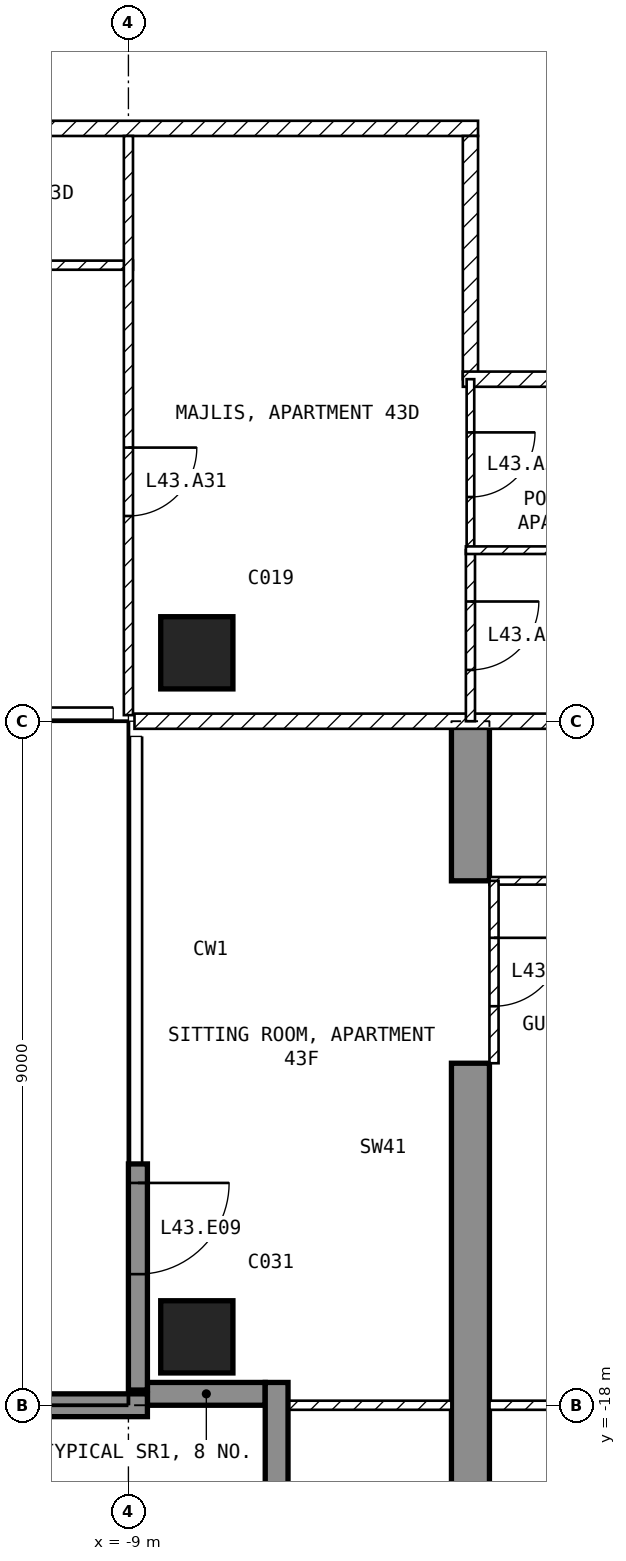
"""IFC4 building model, lengths in metres.
Left out: names, types, materials, properties, quantities, classifications, styles, units other than length and angle.
Written with IfcOpenShell. Run it as: python <this file> out.ifc"""

import sys

from ifc_helpers import new_model, si_unit, direction, frame, frame_2d, origin, origin_2d, place, context, subcontext, project, spatial, polyline, rectangle, outline, extrude, element, fill, save


model = new_model("IFC4")
c1 = context("Model", 3, precision=1e-05, world=origin(), true_north=direction((0.0, 1.0)))
c2 = subcontext(c1, "Body", "Model", "MODEL_VIEW")
j1 = project(units=[si_unit("LENGTHUNIT", "METRE"), si_unit("PLANEANGLEUNIT", "RADIAN")], contexts=[c1])
p1 = place(None, origin())
s1 = spatial("IfcSite", under=j1, at=p1, CompositionType="ELEMENT")
p2 = place(p1, origin())
s2 = spatial("IfcBuilding", under=s1, at=p2, CompositionType="ELEMENT")
p3 = place(p2, frame((0.0, 0.0, 177.1)))
s3 = spatial("IfcBuildingStorey", under=s2, at=p3, CompositionType="ELEMENT", Elevation=177.1)
for number, where, z_axis, x_axis in (
    (1, (-8.1, -17.1, -0.25), (0.0, 0.0, 1.0), (1.0, 0.0, 0.0)),
    (2, (-8.1, -8.1, -0.25), (0.0, 0.0, 1.0), (1.0, 0.0, 0.0)),
):
    element("IfcColumn", number, at=place(p3, frame(where, z_axis=z_axis, x_axis=x_axis)), inside=s3, PredefinedType="COLUMN", context=c2, shape_type="SweptSolid", body=[
        extrude(rectangle(XDim=0.95, YDim=0.95, at=origin_2d()), origin(), (0.0, 0.0, 1.0), 3.5),
    ])
p4 = place(p3, frame((-4.75, -20.225, -0.25), z_axis=(1.0, 0.0, 0.0), x_axis=(0.0, 1.0, 0.0)))
e3 = element("IfcWall", 3, at=p4, inside=s3, PredefinedType="SHEAR", context=c2, shape_type="SweptSolid", body=[
    extrude(outline(polyline([(0.0, 0.0), (6.725, 0.0), (6.725, 2.65), (9.125, 2.65), (9.125, 0.0), (11.225, 0.0), (11.225, 3.5), (0.0, 3.5), (0.0, 0.0)])), origin(), (0.0, 0.0, 1.0), 0.5),
])
p5 = place(p3, frame((-8.875, -14.825, 0.0), z_axis=(0.0, 0.0, 1.0), x_axis=(0.0, -1.0, 0.0)))
e4 = element("IfcWall", 4, at=p5, inside=s3, PredefinedType="SOLIDWALL", context=c2, shape_type="SweptSolid", body=[
    extrude(rectangle(XDim=2.975, YDim=0.25, at=frame_2d((1.488, 0.0))), origin(), (0.0, 0.0, 1.0), 3.25),
])
p6 = place(p5, frame((0.25, 0.0, 0.0)))
e5 = element("IfcOpeningElement", 5, at=p6, cuts=e4, PredefinedType="OPENING", context=c2, shape_type="SweptSolid", body=[
    extrude(rectangle(XDim=1.2, YDim=2.4, at=frame_2d((0.6, 1.2))), frame((0.0, 0.135, 0.0), z_axis=(0.0, -1.0, 0.0), x_axis=(1.0, 0.0, 0.0)), (0.0, 0.0, 1.0), 0.27),
])
p7 = place(p3, frame((-8.75, -17.85, 0.0), z_axis=(0.0, 0.0, 1.0), x_axis=(1.0, 0.0, 0.0)))
e6 = element("IfcWall", 6, at=p7, inside=s3, PredefinedType="SOLIDWALL", context=c2, shape_type="SweptSolid", body=[
    extrude(rectangle(XDim=1.55, YDim=0.3, at=frame_2d((0.775, 0.0))), origin(), (0.0, 0.0, 1.0), 3.25),
])
p8 = place(p3, frame((-7.05, -17.7, 0.0), z_axis=(0.0, 0.0, 1.0), x_axis=(0.0, -1.0, 0.0)))
e7 = element("IfcWall", 7, at=p8, inside=s3, PredefinedType="SOLIDWALL", context=c2, shape_type="SweptSolid", body=[
    extrude(rectangle(XDim=1.8, YDim=0.3, at=frame_2d((0.9, 0.0))), origin(), (0.0, 0.0, 1.0), 3.25),
])
p9 = place(p3, frame((-8.75, -18.0, 0.0), z_axis=(0.0, 0.0, 1.0), x_axis=(-1.0, 0.0, 0.0)))
e8 = element("IfcWall", 8, at=p9, inside=s3, PredefinedType="SOLIDWALL", context=c2, shape_type="SweptSolid", body=[
    extrude(rectangle(XDim=2.95, YDim=0.3, at=frame_2d((1.475, 0.0))), origin(), (0.0, 0.0, 1.0), 3.25),
])
p10 = place(p3, frame((-4.4, -1.2, 0.0), z_axis=(0.0, 0.0, 1.0), x_axis=(-1.0, 0.0, 0.0)))
e9 = element("IfcWall", 9, at=p10, inside=s3, PredefinedType="PARTITIONING", context=c2, shape_type="SweptSolid", body=[
    extrude(rectangle(XDim=17.2, YDim=0.2, at=frame_2d((8.6, 0.0))), origin(), (0.0, 0.0, 1.0), 3.25),
])
p11 = place(p10, frame((12.35, 0.0, 0.0)))
e10 = element("IfcOpeningElement", 10, at=p11, cuts=e9, PredefinedType="OPENING", context=c2, shape_type="SweptSolid", body=[
    extrude(rectangle(XDim=1.0, YDim=2.1, at=frame_2d((0.5, 1.05))), frame((0.0, 0.11, 0.0), z_axis=(0.0, -1.0, 0.0), x_axis=(1.0, 0.0, 0.0)), (0.0, 0.0, 1.0), 0.22),
])
p12 = place(p3, frame((-4.5, -4.5, 0.0), z_axis=(0.0, 0.0, 1.0), x_axis=(0.0, 1.0, 0.0)))
e11 = element("IfcWall", 11, at=p12, inside=s3, PredefinedType="PARTITIONING", context=c2, shape_type="SweptSolid", body=[
    extrude(rectangle(XDim=3.2, YDim=0.2, at=frame_2d((1.6, 0.0))), origin(), (0.0, 0.0, 1.0), 3.25),
])
p13 = place(p3, frame((-1.1, -4.5, 0.0), z_axis=(0.0, 0.0, 1.0), x_axis=(-1.0, 0.0, 0.0)))
e12 = element("IfcWall", 12, at=p13, inside=s3, PredefinedType="PARTITIONING", context=c2, shape_type="SweptSolid", body=[
    extrude(rectangle(XDim=3.5, YDim=0.2, at=frame_2d((1.75, 0.0))), origin(), (0.0, 0.0, 1.0), 3.25),
])
p14 = place(p3, frame((8.92, -9.0, 0.0), z_axis=(0.0, 0.0, 1.0), x_axis=(-1.0, 0.0, 0.0)))
e13 = element("IfcWall", 13, at=p14, inside=s3, PredefinedType="PARTITIONING", context=c2, shape_type="SweptSolid", body=[
    extrude(rectangle(XDim=17.84, YDim=0.2, at=frame_2d((8.92, 0.0))), origin(), (0.0, 0.0, 1.0), 3.25),
])
p15 = place(p14, frame((8.42, 0.0, 0.0)))
e14 = element("IfcOpeningElement", 14, at=p15, cuts=e13, PredefinedType="OPENING", context=c2, shape_type="SweptSolid", body=[
    extrude(rectangle(XDim=1.0, YDim=2.1, at=frame_2d((0.5, 1.05))), frame((0.0, 0.11, 0.0), z_axis=(0.0, -1.0, 0.0), x_axis=(1.0, 0.0, 0.0)), (0.0, 0.0, 1.0), 0.22),
])
p16 = place(p3, frame((-8.94, -3.0, 0.0), z_axis=(0.0, 0.0, 1.0), x_axis=(-1.0, 0.0, 0.0)))
e15 = element("IfcWall", 15, at=p16, inside=s3, PredefinedType="PARTITIONING", context=c2, shape_type="SweptSolid", body=[
    extrude(rectangle(XDim=9.51, YDim=0.12, at=frame_2d((4.755, 0.0))), origin(), (0.0, 0.0, 1.0), 3.25),
])
p17 = place(p16, frame((2.01, 0.0, 0.0)))
e16 = element("IfcOpeningElement", 16, at=p17, cuts=e15, PredefinedType="OPENING", context=c2, shape_type="SweptSolid", body=[
    extrude(rectangle(XDim=0.9, YDim=2.1, at=frame_2d((0.45, 1.05))), frame((0.0, 0.07, 0.0), z_axis=(0.0, -1.0, 0.0), x_axis=(1.0, 0.0, 0.0)), (0.0, 0.0, 1.0), 0.14),
])
p18 = place(p16, frame((7.635, 0.0, 0.0)))
e17 = element("IfcOpeningElement", 17, at=p18, cuts=e15, PredefinedType="OPENING", context=c2, shape_type="SweptSolid", body=[
    extrude(rectangle(XDim=0.9, YDim=2.1, at=frame_2d((0.45, 1.05))), frame((0.0, 0.07, 0.0), z_axis=(0.0, -1.0, 0.0), x_axis=(1.0, 0.0, 0.0)), (0.0, 0.0, 1.0), 0.14),
])
p19 = place(p3, frame((-9.0, -1.3, 0.0), z_axis=(0.0, 0.0, 1.0), x_axis=(0.0, -1.0, 0.0)))
e18 = element("IfcWall", 18, at=p19, inside=s3, PredefinedType="PARTITIONING", context=c2, shape_type="SweptSolid", body=[
    extrude(rectangle(XDim=7.62, YDim=0.12, at=frame_2d((3.81, 0.0))), origin(), (0.0, 0.0, 1.0), 3.25),
])
p20 = place(p19, frame((4.1, 0.0, 0.0)))
e19 = element("IfcOpeningElement", 19, at=p20, cuts=e18, PredefinedType="OPENING", context=c2, shape_type="SweptSolid", body=[
    extrude(rectangle(XDim=0.9, YDim=2.1, at=frame_2d((0.45, 1.05))), frame((0.0, 0.07, 0.0), z_axis=(0.0, -1.0, 0.0), x_axis=(1.0, 0.0, 0.0)), (0.0, 0.0, 1.0), 0.14),
])
p21 = place(p3, frame((-4.5, -4.5, 0.0), z_axis=(0.0, 0.0, 1.0), x_axis=(0.0, -1.0, 0.0)))
e20 = element("IfcWall", 20, at=p21, inside=s3, PredefinedType="PARTITIONING", context=c2, shape_type="SweptSolid", body=[
    extrude(rectangle(XDim=2.25, YDim=0.1, at=frame_2d((1.125, 0.0))), origin(), (0.0, 0.0, 1.0), 3.25),
])
p22 = place(p21, frame((0.7, 0.0, 0.0)))
e21 = element("IfcOpeningElement", 21, at=p22, cuts=e20, PredefinedType="OPENING", context=c2, shape_type="SweptSolid", body=[
    extrude(rectangle(XDim=0.85, YDim=2.1, at=frame_2d((0.425, 1.05))), frame((0.0, 0.06, 0.0), z_axis=(0.0, -1.0, 0.0), x_axis=(1.0, 0.0, 0.0)), (0.0, 0.0, 1.0), 0.12),
])
p23 = place(p3, frame((-4.5, -6.75, 0.0), z_axis=(0.0, 0.0, 1.0), x_axis=(0.0, -1.0, 0.0)))
e22 = element("IfcWall", 22, at=p23, inside=s3, PredefinedType="PARTITIONING", context=c2, shape_type="SweptSolid", body=[
    extrude(rectangle(XDim=2.25, YDim=0.12, at=frame_2d((1.125, 0.0))), origin(), (0.0, 0.0, 1.0), 3.25),
])
p24 = place(p23, frame((0.675, 0.0, 0.0)))
e23 = element("IfcOpeningElement", 23, at=p24, cuts=e22, PredefinedType="OPENING", context=c2, shape_type="SweptSolid", body=[
    extrude(rectangle(XDim=0.9, YDim=2.1, at=frame_2d((0.45, 1.05))), frame((0.0, 0.07, 0.0), z_axis=(0.0, -1.0, 0.0), x_axis=(1.0, 0.0, 0.0)), (0.0, 0.0, 1.0), 0.14),
])
p25 = place(p3, frame((-1.1, -6.75, 0.0), z_axis=(0.0, 0.0, 1.0), x_axis=(-1.0, 0.0, 0.0)))
e24 = element("IfcWall", 24, at=p25, inside=s3, PredefinedType="PARTITIONING", context=c2, shape_type="SweptSolid", body=[
    extrude(rectangle(XDim=3.46, YDim=0.1, at=frame_2d((1.73, 0.0))), origin(), (0.0, 0.0, 1.0), 3.25),
])
p26 = place(p3, frame((-2.1, -11.1, 0.0), z_axis=(0.0, 0.0, 1.0), x_axis=(-1.0, 0.0, 0.0)))
e25 = element("IfcWall", 25, at=p26, inside=s3, PredefinedType="PARTITIONING", context=c2, shape_type="SweptSolid", body=[
    extrude(rectangle(XDim=2.15, YDim=0.1, at=frame_2d((1.075, 0.0))), origin(), (0.0, 0.0, 1.0), 3.25),
])
p27 = place(p3, frame((4.25, -18.0, 0.0), z_axis=(0.0, 0.0, 1.0), x_axis=(-1.0, 0.0, 0.0)))
e26 = element("IfcWall", 26, at=p27, inside=s3, PredefinedType="PARTITIONING", context=c2, shape_type="SweptSolid", body=[
    extrude(rectangle(XDim=8.5, YDim=0.12, at=frame_2d((4.25, 0.0))), origin(), (0.0, 0.0, 1.0), 3.25),
])
p28 = place(p27, frame((5.675, 0.0, 0.0)))
e27 = element("IfcOpeningElement", 27, at=p28, cuts=e26, PredefinedType="OPENING", context=c2, shape_type="SweptSolid", body=[
    extrude(rectangle(XDim=0.9, YDim=2.1, at=frame_2d((0.45, 1.05))), frame((0.0, 0.07, 0.0), z_axis=(0.0, -1.0, 0.0), x_axis=(1.0, 0.0, 0.0)), (0.0, 0.0, 1.0), 0.14),
])
p29 = place(p3, frame((-4.75, -18.0, 0.0), z_axis=(0.0, 0.0, 1.0), x_axis=(-1.0, 0.0, 0.0)))
e28 = element("IfcWall", 28, at=p29, inside=s3, PredefinedType="PARTITIONING", context=c2, shape_type="SweptSolid", body=[
    extrude(rectangle(XDim=2.37, YDim=0.12, at=frame_2d((1.185, 0.0))), origin(), (0.0, 0.0, 1.0), 3.25),
])
p30 = place(p3, frame((-4.19, -11.1, 0.0), z_axis=(0.0, 0.0, 1.0), x_axis=(0.0, -1.0, 0.0)))
e29 = element("IfcWall", 29, at=p30, inside=s3, PredefinedType="PARTITIONING", context=c2, shape_type="SweptSolid", body=[
    extrude(rectangle(XDim=2.4, YDim=0.12, at=frame_2d((1.2, 0.0))), origin(), (0.0, 0.0, 1.0), 2.4),
])
p31 = place(p30, frame((0.75, 0.0, 0.0)))
e30 = element("IfcOpeningElement", 30, at=p31, cuts=e29, PredefinedType="OPENING", context=c2, shape_type="SweptSolid", body=[
    extrude(rectangle(XDim=0.9, YDim=2.1, at=frame_2d((0.45, 1.05))), frame((0.0, 0.07, 0.0), z_axis=(0.0, -1.0, 0.0), x_axis=(1.0, 0.0, 0.0)), (0.0, 0.0, 1.0), 0.14),
])
p32 = place(p6, origin())
e31 = element("IfcDoor", 31, at=p32, inside=s3, OperationType="SINGLE_SWING_LEFT", PredefinedType="DOOR", context=c2, shape_type="SweptSolid", body=[
    extrude(rectangle(XDim=1.2, YDim=2.4, at=frame_2d((0.6, 1.2))), frame((0.0, 0.025, 0.0), z_axis=(0.0, -1.0, 0.0), x_axis=(1.0, 0.0, 0.0)), (0.0, 0.0, 1.0), 0.05),
])
fill(e5, e31)
p33 = place(p24, origin())
e32 = element("IfcDoor", 32, at=p33, inside=s3, OperationType="SINGLE_SWING_LEFT", PredefinedType="DOOR", context=c2, shape_type="SweptSolid", body=[
    extrude(rectangle(XDim=0.9, YDim=2.1, at=frame_2d((0.45, 1.05))), frame((0.0, 0.025, 0.0), z_axis=(0.0, -1.0, 0.0), x_axis=(1.0, 0.0, 0.0)), (0.0, 0.0, 1.0), 0.05),
])
fill(e23, e32)
p34 = place(p20, origin())
e33 = element("IfcDoor", 33, at=p34, inside=s3, OperationType="SINGLE_SWING_LEFT", PredefinedType="DOOR", context=c2, shape_type="SweptSolid", body=[
    extrude(rectangle(XDim=0.9, YDim=2.1, at=frame_2d((0.45, 1.05))), frame((0.0, 0.025, 0.0), z_axis=(0.0, -1.0, 0.0), x_axis=(1.0, 0.0, 0.0)), (0.0, 0.0, 1.0), 0.05),
])
fill(e19, e33)
p35 = place(p22, origin())
e34 = element("IfcDoor", 34, at=p35, inside=s3, OperationType="SINGLE_SWING_LEFT", PredefinedType="DOOR", context=c2, shape_type="SweptSolid", body=[
    extrude(rectangle(XDim=0.85, YDim=2.1, at=frame_2d((0.425, 1.05))), frame((0.0, 0.025, 0.0), z_axis=(0.0, -1.0, 0.0), x_axis=(1.0, 0.0, 0.0)), (0.0, 0.0, 1.0), 0.05),
])
fill(e21, e34)
p36 = place(p31, origin())
e35 = element("IfcDoor", 35, at=p36, inside=s3, OperationType="SINGLE_SWING_LEFT", PredefinedType="DOOR", context=c2, shape_type="SweptSolid", body=[
    extrude(rectangle(XDim=0.9, YDim=2.1, at=frame_2d((0.45, 1.05))), frame((0.0, 0.025, 0.0), z_axis=(0.0, -1.0, 0.0), x_axis=(1.0, 0.0, 0.0)), (0.0, 0.0, 1.0), 0.05),
])
fill(e30, e35)
save(model, sys.argv[1])
